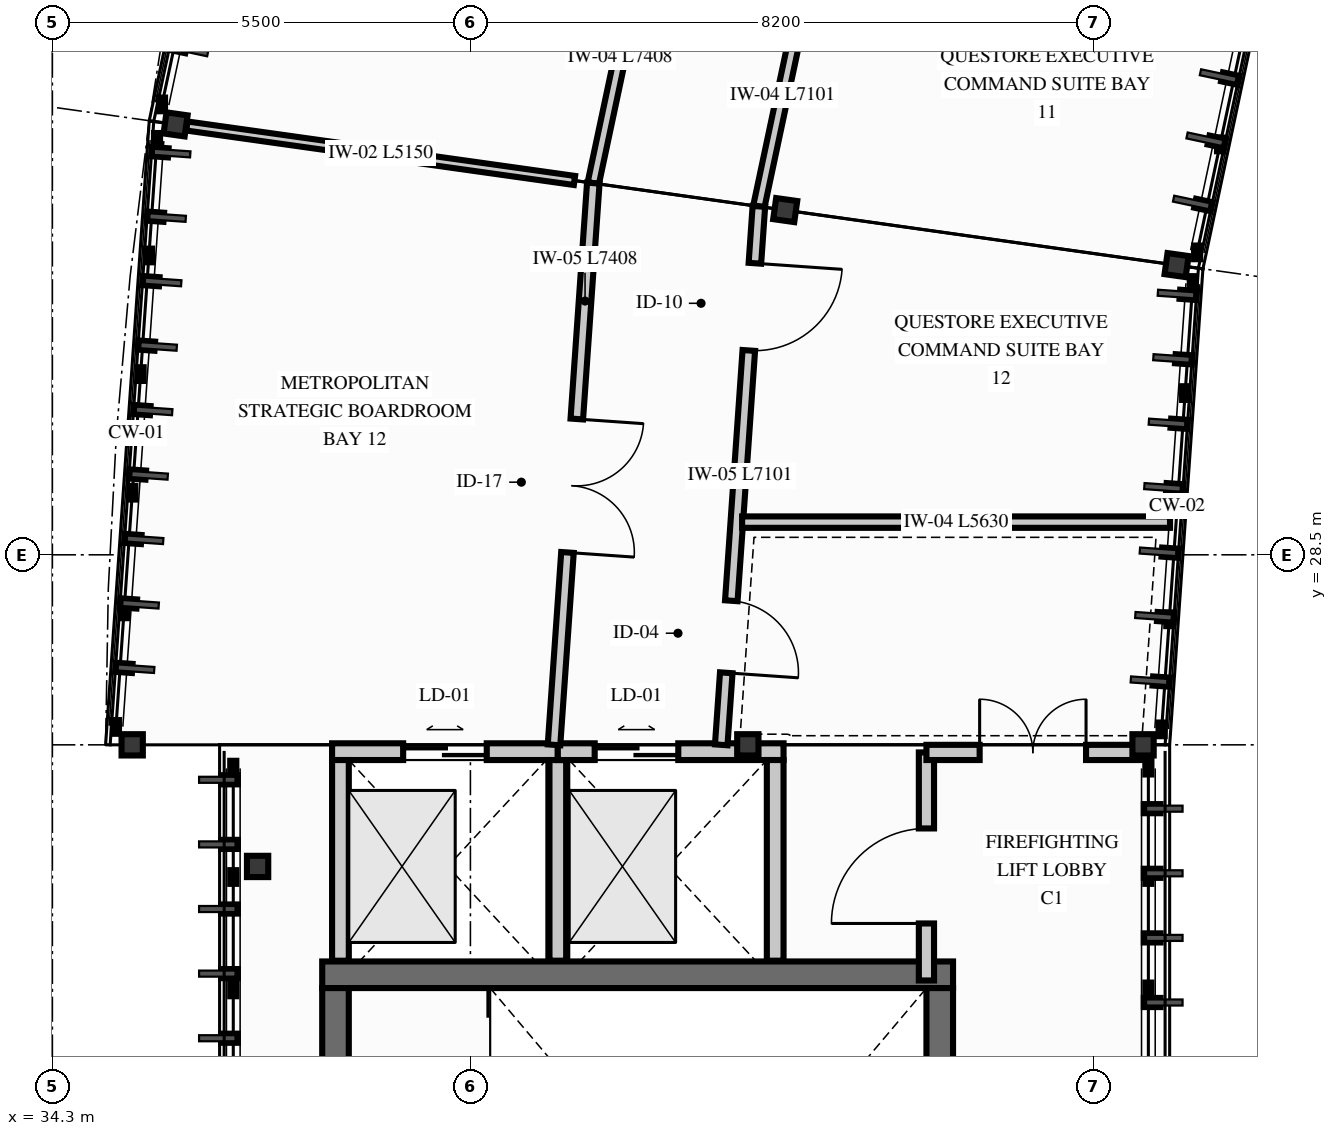
"""IFC4 building model, lengths in metres.
Left out: names, types, materials, properties, quantities, classifications, styles, units other than length and angle.
Written with IfcOpenShell. Run it as: python <this file> out.ifc"""

import sys

from ifc_helpers import new_model, si_unit, direction, frame, frame_2d, origin, origin_2d, place, context, subcontext, project, spatial, rectangle, i_section, extrude, element, fill, save


model = new_model("IFC4")
c1 = context("Model", 3, precision=1e-05, world=origin(), true_north=direction((0.0, 1.0)))
c2 = subcontext(c1, "Body", "Model", "MODEL_VIEW")
j1 = project(units=[si_unit("LENGTHUNIT", "METRE"), si_unit("PLANEANGLEUNIT", "RADIAN")], contexts=[c1])
p1 = place(None, origin())
s1 = spatial("IfcSite", under=j1, at=p1, CompositionType="ELEMENT")
p2 = place(p1, origin())
s2 = spatial("IfcBuilding", under=s1, at=p2, CompositionType="ELEMENT")
p3 = place(p2, frame((0.0, 0.0, 29.4)))
s3 = spatial("IfcBuildingStorey", under=s2, at=p3, CompositionType="ELEMENT", Elevation=29.4)
p4 = place(p3, frame((37.85, 22.975, 0.0), z_axis=(0.0, 0.0, 1.0), x_axis=(1.0, 0.0, 0.0)))
e1 = element("IfcWall", 1, at=p4, inside=s3, PredefinedType="SHEAR", context=c2, shape_type="SweptSolid", body=[
    extrude(rectangle(XDim=8.3, YDim=0.35, at=frame_2d((4.15, 0.0))), origin(), (0.0, 0.0, 1.0), 3.25),
])
p5 = place(p3, frame((38.025, 16.0, 0.0), z_axis=(0.0, 0.0, 1.0), x_axis=(0.0, 1.0, 0.0)))
e2 = element("IfcWall", 2, at=p5, inside=s3, PredefinedType="SHEAR", context=c2, shape_type="SweptSolid", body=[
    extrude(rectangle(XDim=6.8, YDim=0.35, at=frame_2d((3.4, 0.0))), origin(), (0.0, 0.0, 1.0), 3.25),
])
p6 = place(p5, frame((2.6, 0.0, 0.0)))
e3 = element("IfcOpeningElement", 3, at=p6, cuts=e2, PredefinedType="OPENING", context=c2, shape_type="SweptSolid", body=[
    extrude(rectangle(XDim=1.25, YDim=2.2, at=frame_2d((0.625, 1.1))), frame((0.0, 0.185, 0.0), z_axis=(0.0, -1.0, 0.0), x_axis=(1.0, 0.0, 0.0)), (0.0, 0.0, 1.0), 0.37),
])
p7 = place(p3, frame((45.975, 16.0, 0.0), z_axis=(0.0, 0.0, 1.0), x_axis=(0.0, 1.0, 0.0)))
e4 = element("IfcWall", 4, at=p7, inside=s3, PredefinedType="SHEAR", context=c2, shape_type="SweptSolid", body=[
    extrude(rectangle(XDim=6.8, YDim=0.35, at=frame_2d((3.4, 0.0))), origin(), (0.0, 0.0, 1.0), 3.25),
])
p8 = place(p3, frame((49.091, 32.312, 0.0), z_axis=(0.0, 0.0, 1.0), x_axis=(0.13917310096, 0.990268068742, 0.0)))
e5 = element("IfcColumn", 5, at=p8, inside=s3, PredefinedType="COLUMN", context=c2, shape_type="SweptSolid", body=[
    extrude(i_section(OverallWidth=0.28, OverallDepth=0.28, WebThickness=0.01, FlangeThickness=0.018, FilletRadius=0.024, at=origin_2d()), origin(), (0.0, 0.0, 1.0), 3.308),
])
p9 = place(p3, frame((43.942, 33.035, 0.0), z_axis=(0.0, 0.0, 1.0), x_axis=(0.13917310096, 0.990268068742, 0.0)))
e6 = element("IfcColumn", 6, at=p9, inside=s3, PredefinedType="COLUMN", context=c2, shape_type="SweptSolid", body=[
    extrude(i_section(OverallWidth=0.28, OverallDepth=0.28, WebThickness=0.01, FlangeThickness=0.018, FilletRadius=0.024, at=origin_2d()), origin(), (0.0, 0.0, 1.0), 4.162),
])
p10 = place(p3, frame((35.921, 34.163, 0.0), z_axis=(0.0, 0.0, 1.0), x_axis=(0.13917310096, 0.990268068742, 0.0)))
e7 = element("IfcColumn", 7, at=p10, inside=s3, PredefinedType="COLUMN", context=c2, shape_type="SweptSolid", body=[
    extrude(i_section(OverallWidth=0.28, OverallDepth=0.28, WebThickness=0.01, FlangeThickness=0.018, FilletRadius=0.024, at=origin_2d()), origin(), (0.0, 0.0, 1.0), 3.308),
])
for number, where, z_axis, x_axis in (
    (8, (48.65, 26.0, 0.0), (0.0, 0.0, 1.0), (0.0, 1.0, 0.0)),
    (9, (43.45, 26.0, 0.0), (0.0, 0.0, 1.0), (0.0, 1.0, 0.0)),
):
    element("IfcColumn", number, at=place(p3, frame(where, z_axis=z_axis, x_axis=x_axis)), inside=s3, PredefinedType="COLUMN", context=c2, shape_type="SweptSolid", body=[
        extrude(i_section(OverallWidth=0.28, OverallDepth=0.28, WebThickness=0.01, FlangeThickness=0.018, FilletRadius=0.024, at=origin_2d()), origin(), (0.0, 0.0, 1.0), 3.46),
    ])
p11 = place(p3, frame((35.35, 26.0, 0.0), z_axis=(0.0, 0.0, 1.0), x_axis=(0.0, 1.0, 0.0)))
e10 = element("IfcColumn", 10, at=p11, inside=s3, PredefinedType="COLUMN", context=c2, shape_type="SweptSolid", body=[
    extrude(i_section(OverallWidth=0.28, OverallDepth=0.28, WebThickness=0.01, FlangeThickness=0.018, FilletRadius=0.024, at=origin_2d()), origin(), (0.0, 0.0, 1.0), 3.508),
])
p12 = place(p3, frame((37.0, 24.4, 0.0), z_axis=(0.0, 0.0, 1.0), x_axis=(1.0, 0.0, 0.0)))
e11 = element("IfcColumn", 11, at=p12, inside=s3, PredefinedType="COLUMN", context=c2, shape_type="SweptSolid", body=[
    extrude(i_section(OverallWidth=0.28, OverallDepth=0.28, WebThickness=0.01, FlangeThickness=0.018, FilletRadius=0.024, at=origin_2d()), origin(), (0.0, 0.0, 1.0), 3.46),
])
p13 = place(p3, frame((37.98, 25.91, 0.0), z_axis=(0.0, 0.0, 1.0), x_axis=(1.0, 0.0, 0.0)))
e12 = element("IfcWall", 12, at=p13, inside=s3, PredefinedType="PARTITIONING", context=c2, shape_type="SweptSolid", body=[
    extrude(rectangle(XDim=2.97, YDim=0.22, at=frame_2d((1.485, 0.0))), origin(), (0.0, 0.0, 1.0), 3.2),
])
p14 = place(p13, frame((0.935, 0.0, 0.0)))
e13 = element("IfcOpeningElement", 13, at=p14, cuts=e12, PredefinedType="OPENING", context=c2, shape_type="SweptSolid", body=[
    extrude(rectangle(XDim=1.1, YDim=2.15, at=frame_2d((0.55, 1.075))), frame((0.0, 0.12, 0.0), z_axis=(0.0, -1.0, 0.0), x_axis=(1.0, 0.0, 0.0)), (0.0, 0.0, 1.0), 0.24),
])
for number, where, z_axis, x_axis in (
    (14, (38.09, 23.16, 0.0), (0.0, 0.0, 1.0), (0.0, 1.0, 0.0)),
    (15, (40.95, 23.16, 0.0), (0.0, 0.0, 1.0), (0.0, 1.0, 0.0)),
):
    element("IfcWall", number, at=place(p3, frame(where, z_axis=z_axis, x_axis=x_axis)), inside=s3, PredefinedType="PARTITIONING", context=c2, shape_type="SweptSolid", body=[
        extrude(rectangle(XDim=2.64, YDim=0.22, at=frame_2d((1.32, 0.0))), origin(), (0.0, 0.0, 1.0), 3.2),
    ])
p15 = place(p3, frame((40.95, 25.91, 0.0), z_axis=(0.0, 0.0, 1.0), x_axis=(1.0, 0.0, 0.0)))
e16 = element("IfcWall", 16, at=p15, inside=s3, PredefinedType="PARTITIONING", context=c2, shape_type="SweptSolid", body=[
    extrude(rectangle(XDim=2.97, YDim=0.22, at=frame_2d((1.485, 0.0))), origin(), (0.0, 0.0, 1.0), 3.2),
])
p16 = place(p15, frame((0.485, 0.0, 0.0)))
e17 = element("IfcOpeningElement", 17, at=p16, cuts=e16, PredefinedType="OPENING", context=c2, shape_type="SweptSolid", body=[
    extrude(rectangle(XDim=1.1, YDim=2.15, at=frame_2d((0.55, 1.075))), frame((0.0, 0.12, 0.0), z_axis=(0.0, -1.0, 0.0), x_axis=(1.0, 0.0, 0.0)), (0.0, 0.0, 1.0), 0.24),
])
p17 = place(p3, frame((43.81, 23.16, 0.0), z_axis=(0.0, 0.0, 1.0), x_axis=(0.0, 1.0, 0.0)))
e18 = element("IfcWall", 18, at=p17, inside=s3, PredefinedType="PARTITIONING", context=c2, shape_type="SweptSolid", body=[
    extrude(rectangle(XDim=2.64, YDim=0.22, at=frame_2d((1.32, 0.0))), origin(), (0.0, 0.0, 1.0), 3.2),
])
p18 = place(p3, frame((45.8, 22.9, 0.0), z_axis=(0.0, 0.0, 1.0), x_axis=(0.0, 1.0, 0.0)))
e19 = element("IfcWall", 19, at=p18, inside=s3, PredefinedType="PARTITIONING", context=c2, shape_type="SweptSolid", body=[
    extrude(rectangle(XDim=3.0, YDim=0.2, at=frame_2d((1.5, 0.0))), origin(), (0.0, 0.0, 1.0), 3.2),
])
p19 = place(p18, frame((0.75, 0.0, 0.0)))
e20 = element("IfcOpeningElement", 20, at=p19, cuts=e19, PredefinedType="OPENING", context=c2, shape_type="SweptSolid", body=[
    extrude(rectangle(XDim=1.25, YDim=2.2, at=frame_2d((0.625, 1.1))), frame((0.0, 0.11, 0.0), z_axis=(0.0, -1.0, 0.0), x_axis=(1.0, 0.0, 0.0)), (0.0, 0.0, 1.0), 0.22),
])
p20 = place(p3, frame((45.8, 25.9, 0.0), z_axis=(0.0, 0.0, 1.0), x_axis=(1.0, 0.0, 0.0)))
e21 = element("IfcWall", 21, at=p20, inside=s3, PredefinedType="PARTITIONING", context=c2, shape_type="SweptSolid", body=[
    extrude(rectangle(XDim=2.85, YDim=0.2, at=frame_2d((1.425, 0.0))), origin(), (0.0, 0.0, 1.0), 3.2),
])
p21 = place(p20, frame((0.7, 0.0, 0.0)))
e22 = element("IfcOpeningElement", 22, at=p21, cuts=e21, PredefinedType="OPENING", context=c2, shape_type="SweptSolid", body=[
    extrude(rectangle(XDim=1.4, YDim=2.25, at=frame_2d((0.7, 1.125))), frame((0.0, 0.11, 0.0), z_axis=(0.0, -1.0, 0.0), x_axis=(1.0, 0.0, 0.0)), (0.0, 0.0, 1.0), 0.22),
])
p22 = place(p3, frame((45.072, 40.03, 0.0), z_axis=(0.0, 0.0, 1.0), x_axis=(-0.207903987445, -0.978149238104, 0.0)))
e23 = element("IfcWall", 23, at=p22, inside=s3, PredefinedType="PARTITIONING", context=c2, shape_type="SweptSolid", body=[
    extrude(rectangle(XDim=7.101, YDim=0.15, at=frame_2d((3.551, 0.0))), origin(), (0.0, 0.0, 1.0), 3.2),
])
p23 = place(p22, frame((2.982, 0.0, 0.0)))
e24 = element("IfcOpeningElement", 24, at=p23, cuts=e23, PredefinedType="OPENING", context=c2, shape_type="SweptSolid", body=[
    extrude(rectangle(XDim=1.12, YDim=2.2, at=frame_2d((0.56, 1.1))), frame((0.0, 0.085, 0.0), z_axis=(0.0, -1.0, 0.0), x_axis=(1.0, 0.0, 0.0)), (0.0, 0.0, 1.0), 0.17),
])
p24 = place(p3, frame((42.957, 40.636, 0.0), z_axis=(0.0, 0.0, 1.0), x_axis=(-0.207921820376, -0.978145447575, 0.0)))
e25 = element("IfcWall", 25, at=p24, inside=s3, PredefinedType="PARTITIONING", context=c2, shape_type="SweptSolid", body=[
    extrude(rectangle(XDim=7.408, YDim=0.15, at=frame_2d((3.704, 0.0))), origin(), (0.0, 0.0, 1.0), 3.2),
])
p25 = place(p24, frame((3.111, 0.0, 0.0)))
e26 = element("IfcOpeningElement", 26, at=p25, cuts=e25, PredefinedType="OPENING", context=c2, shape_type="SweptSolid", body=[
    extrude(rectangle(XDim=0.9, YDim=2.1, at=frame_2d((0.45, 1.05))), frame((0.0, 0.085, 0.0), z_axis=(0.0, -1.0, 0.0), x_axis=(1.0, 0.0, 0.0)), (0.0, 0.0, 1.0), 0.17),
])
p26 = place(p3, frame((41.169, 33.425, 0.0), z_axis=(0.0, 0.0, 1.0), x_axis=(-0.990266484291, 0.13918437445, 0.0)))
e27 = element("IfcWall", 27, at=p26, inside=s3, PredefinedType="PARTITIONING", context=c2, shape_type="SweptSolid", body=[
    extrude(rectangle(XDim=5.15, YDim=0.12, at=frame_2d((2.575, 0.0))), origin(), (0.0, 0.0, 1.0), 3.2),
])
p27 = place(p3, frame((43.595, 33.084, 0.0), z_axis=(0.0, 0.0, 1.0), x_axis=(-0.069756597752, -0.997564041588, 0.0)))
e28 = element("IfcWall", 28, at=p27, inside=s3, PredefinedType="PARTITIONING", context=c2, shape_type="SweptSolid", body=[
    extrude(rectangle(XDim=7.101, YDim=0.165, at=frame_2d((3.551, 0.0))), origin(), (0.0, 0.0, 1.0), 3.2),
])
p28 = place(p27, frame((5.201, 0.0, 0.0)))
e29 = element("IfcOpeningElement", 29, at=p28, cuts=e28, PredefinedType="OPENING", context=c2, shape_type="SweptSolid", body=[
    extrude(rectangle(XDim=0.95, YDim=2.15, at=frame_2d((0.475, 1.075))), frame((0.0, 0.093, 0.0), z_axis=(0.0, -1.0, 0.0), x_axis=(1.0, 0.0, 0.0)), (0.0, 0.0, 1.0), 0.185),
])
p29 = place(p27, frame((0.75, 0.0, 0.0)))
e30 = element("IfcOpeningElement", 30, at=p29, cuts=e28, PredefinedType="OPENING", context=c2, shape_type="SweptSolid", body=[
    extrude(rectangle(XDim=1.15, YDim=2.2, at=frame_2d((0.575, 1.1))), frame((0.0, 0.093, 0.0), z_axis=(0.0, -1.0, 0.0), x_axis=(1.0, 0.0, 0.0)), (0.0, 0.0, 1.0), 0.185),
])
p30 = place(p3, frame((41.417, 33.39, 0.0), z_axis=(0.0, 0.0, 1.0), x_axis=(-0.069766817412, -0.997563326906, 0.0)))
e31 = element("IfcWall", 31, at=p30, inside=s3, PredefinedType="PARTITIONING", context=c2, shape_type="SweptSolid", body=[
    extrude(rectangle(XDim=7.408, YDim=0.165, at=frame_2d((3.704, 0.0))), origin(), (0.0, 0.0, 1.0), 3.2),
])
p31 = place(p30, frame((3.111, 0.0, 0.0)))
e32 = element("IfcOpeningElement", 32, at=p31, cuts=e31, PredefinedType="OPENING", context=c2, shape_type="SweptSolid", body=[
    extrude(rectangle(XDim=1.76, YDim=2.36, at=frame_2d((0.88, 1.18))), frame((0.0, 0.093, 0.0), z_axis=(0.0, -1.0, 0.0), x_axis=(1.0, 0.0, 0.0)), (0.0, 0.0, 1.0), 0.185),
])
p32 = place(p3, frame((43.375, 28.93, 0.0), z_axis=(0.0, 0.0, 1.0), x_axis=(1.0, 0.0, 0.0)))
e33 = element("IfcWall", 33, at=p32, inside=s3, PredefinedType="PARTITIONING", context=c2, shape_type="SweptSolid", body=[
    extrude(rectangle(XDim=5.63, YDim=0.15, at=frame_2d((2.815, 0.0))), origin(), (0.0, 0.0, 1.0), 3.2),
])
p33 = place(p14, origin())
e34 = element("IfcDoor", 34, at=p33, inside=s3, OperationType="DOUBLE_DOOR_SLIDING", PredefinedType="DOOR", context=c2, shape_type="SweptSolid", body=[
    extrude(rectangle(XDim=1.1, YDim=2.15, at=frame_2d((0.55, 1.075))), frame((0.0, 0.025, 0.0), z_axis=(0.0, -1.0, 0.0), x_axis=(1.0, 0.0, 0.0)), (0.0, 0.0, 1.0), 0.05),
])
fill(e13, e34)
p34 = place(p16, origin())
e35 = element("IfcDoor", 35, at=p34, inside=s3, OperationType="DOUBLE_DOOR_SLIDING", PredefinedType="DOOR", context=c2, shape_type="SweptSolid", body=[
    extrude(rectangle(XDim=1.1, YDim=2.15, at=frame_2d((0.55, 1.075))), frame((0.0, 0.025, 0.0), z_axis=(0.0, -1.0, 0.0), x_axis=(1.0, 0.0, 0.0)), (0.0, 0.0, 1.0), 0.05),
])
fill(e17, e35)
p35 = place(p21, origin())
e36 = element("IfcDoor", 36, at=p35, inside=s3, OperationType="DOUBLE_DOOR_SINGLE_SWING", PredefinedType="DOOR", context=c2, shape_type="SweptSolid", body=[
    extrude(rectangle(XDim=1.4, YDim=2.25, at=frame_2d((0.7, 1.125))), frame((0.0, 0.025, 0.0), z_axis=(0.0, -1.0, 0.0), x_axis=(1.0, 0.0, 0.0)), (0.0, 0.0, 1.0), 0.05),
])
fill(e22, e36)
p36 = place(p19, origin())
e37 = element("IfcDoor", 37, at=p36, inside=s3, OperationType="SINGLE_SWING_LEFT", PredefinedType="DOOR", context=c2, shape_type="SweptSolid", body=[
    extrude(rectangle(XDim=1.25, YDim=2.2, at=frame_2d((0.625, 1.1))), frame((0.0, 0.025, 0.0), z_axis=(0.0, -1.0, 0.0), x_axis=(1.0, 0.0, 0.0)), (0.0, 0.0, 1.0), 0.05),
])
fill(e20, e37)
p37 = place(p28, origin())
e38 = element("IfcDoor", 38, at=p37, inside=s3, OperationType="SINGLE_SWING_RIGHT", PredefinedType="DOOR", context=c2, shape_type="SweptSolid", body=[
    extrude(rectangle(XDim=0.95, YDim=2.15, at=frame_2d((0.475, 1.075))), frame((0.0, 0.025, 0.0), z_axis=(0.0, -1.0, 0.0), x_axis=(1.0, 0.0, 0.0)), (0.0, 0.0, 1.0), 0.05),
])
fill(e29, e38)
p38 = place(p29, origin())
e39 = element("IfcDoor", 39, at=p38, inside=s3, OperationType="SINGLE_SWING_LEFT", PredefinedType="DOOR", context=c2, shape_type="SweptSolid", body=[
    extrude(rectangle(XDim=1.15, YDim=2.2, at=frame_2d((0.575, 1.1))), frame((0.0, 0.025, 0.0), z_axis=(0.0, -1.0, 0.0), x_axis=(1.0, 0.0, 0.0)), (0.0, 0.0, 1.0), 0.05),
])
fill(e30, e39)
p39 = place(p31, origin())
e40 = element("IfcDoor", 40, at=p39, inside=s3, OperationType="DOUBLE_DOOR_SINGLE_SWING", PredefinedType="DOOR", context=c2, shape_type="SweptSolid", body=[
    extrude(rectangle(XDim=1.76, YDim=2.36, at=frame_2d((0.88, 1.18))), frame((0.0, 0.025, 0.0), z_axis=(0.0, -1.0, 0.0), x_axis=(1.0, 0.0, 0.0)), (0.0, 0.0, 1.0), 0.05),
])
fill(e32, e40)
save(model, sys.argv[1])
